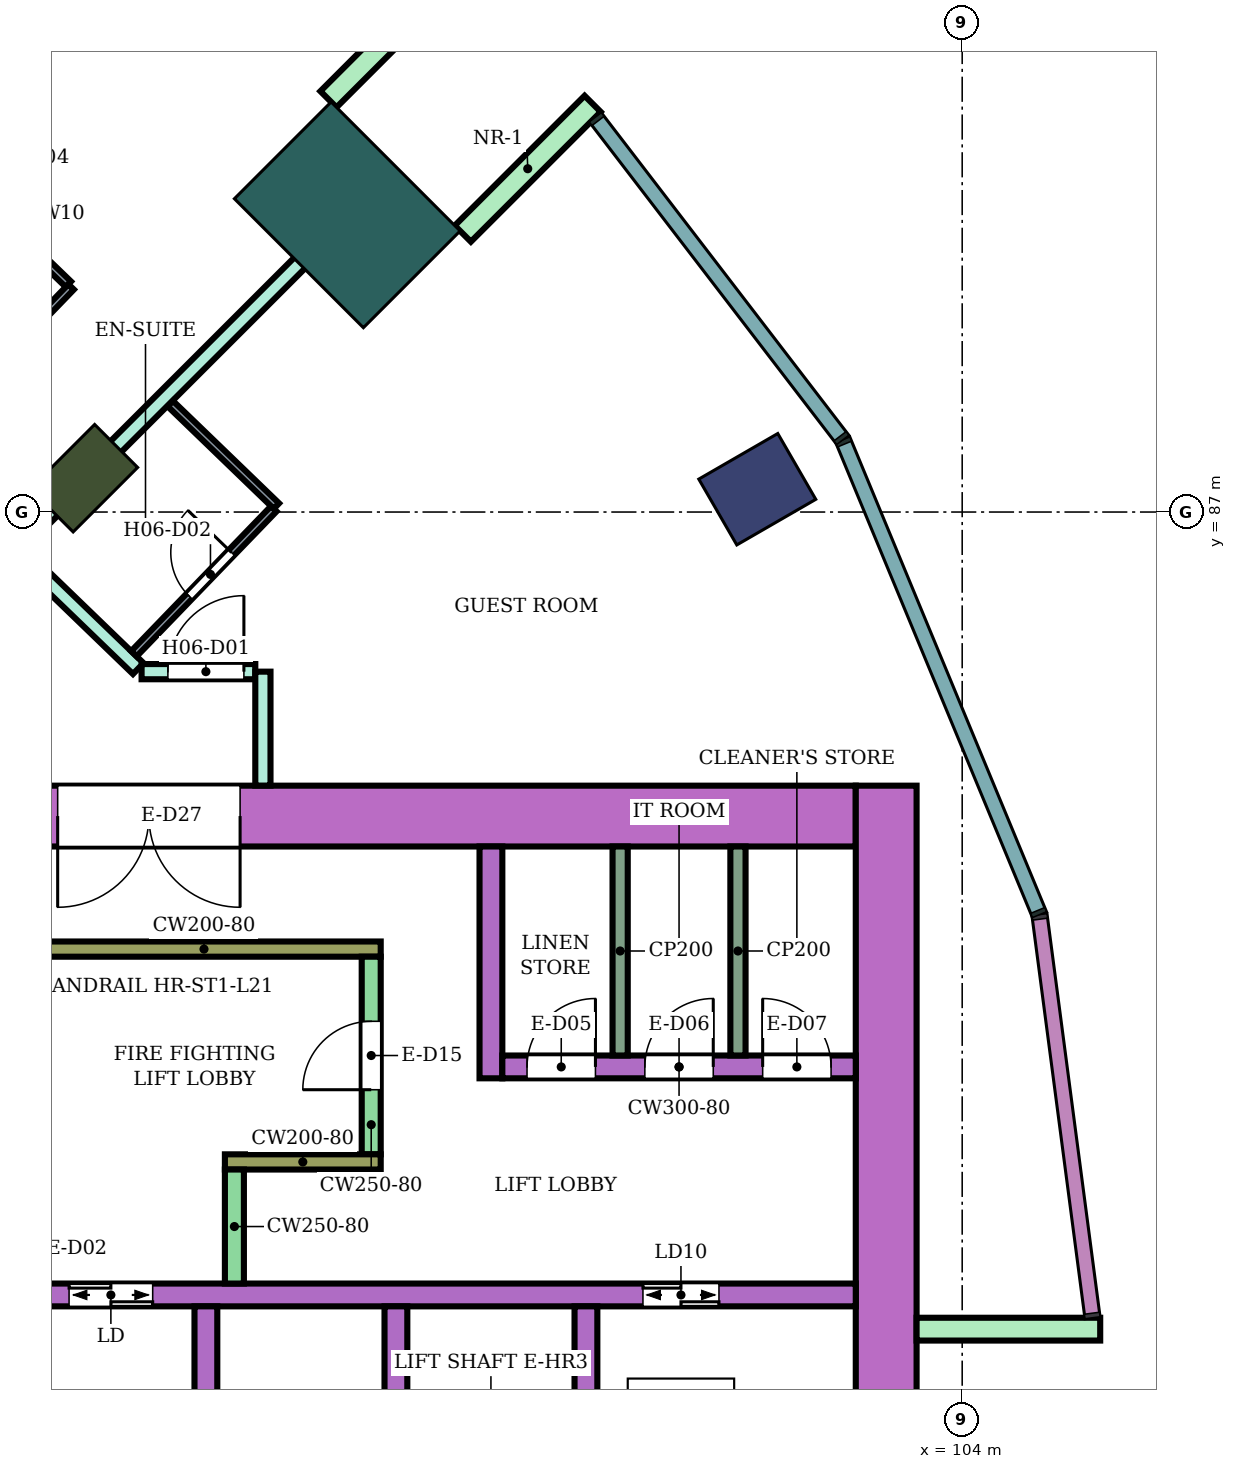
"""IFC4 building model, lengths in metres.
Left out: names, types, materials, properties, quantities, classifications, styles, units other than length and angle.
Written with IfcOpenShell. Run it as: python <this file> out.ifc"""

import sys

from ifc_helpers import new_model, si_unit, direction, frame, frame_2d, origin, origin_2d, place, context, subcontext, project, spatial, rectangle, extrude, element, fill, save


model = new_model("IFC4")
c1 = context("Model", 3, precision=1e-05, world=origin(), true_north=direction((0.0, 1.0)))
c2 = subcontext(c1, "Body", "Model", "MODEL_VIEW")
j1 = project(units=[si_unit("LENGTHUNIT", "METRE"), si_unit("PLANEANGLEUNIT", "RADIAN")], contexts=[c1])
p1 = place(None, origin())
s1 = spatial("IfcSite", under=j1, at=p1, CompositionType="ELEMENT")
p2 = place(p1, origin())
s2 = spatial("IfcBuilding", under=s1, at=p2, CompositionType="ELEMENT")
p3 = place(p2, frame((0.0, 0.0, 93.8)))
s3 = spatial("IfcBuildingStorey", under=s2, at=p3, CompositionType="ELEMENT", Elevation=93.8)
p4 = place(p3, frame((101.304, 87.3, 0.0), z_axis=(0.0, 0.0, 1.0), x_axis=(0.866025403784, 0.5, 0.0)))
e1 = element("IfcColumn", 1, at=p4, inside=s3, PredefinedType="COLUMN", context=c2, shape_type="SweptSolid", body=[
    extrude(rectangle(XDim=1.2, YDim=1.0, at=origin_2d()), origin(), (0.0, 0.0, 1.0), 3.8),
])
p5 = place(p3, frame((92.445, 87.445, 0.0), z_axis=(0.0, 0.0, 1.0), x_axis=(0.707106781187, 0.707106781187, 0.0)))
e2 = element("IfcColumn", 2, at=p5, inside=s3, PredefinedType="COLUMN", context=c2, shape_type="SweptSolid", body=[
    extrude(rectangle(XDim=1.2, YDim=0.8, at=origin_2d()), origin(), (0.0, 0.0, 1.0), 3.8),
])
p6 = place(p3, frame((95.91, 90.91, 0.0), z_axis=(0.0, 0.0, 1.0), x_axis=(0.707106781187, 0.707106781187, 0.0)))
e3 = element("IfcColumn", 3, at=p6, inside=s3, PredefinedType="COLUMN", context=c2, shape_type="SweptSolid", body=[
    extrude(rectangle(XDim=1.8, YDim=2.4, at=origin_2d()), origin(), (0.0, 0.0, 1.0), 3.8),
])
p7 = place(p3, frame((87.9, 83.0, 0.0), z_axis=(0.0, 0.0, 1.0), x_axis=(1.0, 0.0, 0.0)))
e4 = element("IfcWall", 4, at=p7, inside=s3, PredefinedType="SHEAR", context=c2, shape_type="SweptSolid", body=[
    extrude(rectangle(XDim=14.7, YDim=0.8, at=frame_2d((7.35, 0.0))), origin(), (0.0, 0.0, 1.0), 3.48),
])
p8 = place(p7, frame((4.2, 0.0, 0.0)))
e5 = element("IfcOpeningElement", 5, at=p8, cuts=e4, PredefinedType="OPENING", context=c2, shape_type="SweptSolid", body=[
    extrude(rectangle(XDim=2.4, YDim=2.4, at=frame_2d((1.2, 1.2))), frame((0.0, 0.41, 0.0), z_axis=(0.0, -1.0, 0.0), x_axis=(1.0, 0.0, 0.0)), (0.0, 0.0, 1.0), 0.82),
])
p9 = place(p3, frame((103.0, 66.6, 0.0), z_axis=(0.0, 0.0, 1.0), x_axis=(0.0, 1.0, 0.0)))
e6 = element("IfcWall", 6, at=p9, inside=s3, PredefinedType="SHEAR", context=c2, shape_type="SweptSolid", body=[
    extrude(rectangle(XDim=16.8, YDim=0.8, at=frame_2d((8.4, 0.0))), origin(), (0.0, 0.0, 1.0), 3.48),
])
p10 = place(p3, frame((91.7, 76.7, 0.0), z_axis=(0.0, 0.0, 1.0), x_axis=(1.0, 0.0, 0.0)))
e7 = element("IfcWall", 7, at=p10, inside=s3, PredefinedType="SHEAR", context=c2, shape_type="SweptSolid", body=[
    extrude(rectangle(XDim=10.9, YDim=0.3, at=frame_2d((5.45, 0.0))), origin(), (0.0, 0.0, 1.0), 3.48),
])
p11 = place(p10, frame((0.55, 0.0, 0.0)))
e8 = element("IfcOpeningElement", 8, at=p11, cuts=e7, PredefinedType="OPENING", context=c2, shape_type="SweptSolid", body=[
    extrude(rectangle(XDim=1.1, YDim=2.1, at=frame_2d((0.55, 1.05))), frame((0.0, 0.16, 0.0), z_axis=(0.0, -1.0, 0.0), x_axis=(1.0, 0.0, 0.0)), (0.0, 0.0, 1.0), 0.32),
])
p12 = place(p10, frame((8.1, 0.0, 0.0)))
e9 = element("IfcOpeningElement", 9, at=p12, cuts=e7, PredefinedType="OPENING", context=c2, shape_type="SweptSolid", body=[
    extrude(rectangle(XDim=1.0, YDim=2.1, at=frame_2d((0.5, 1.05))), frame((0.0, 0.16, 0.0), z_axis=(0.0, -1.0, 0.0), x_axis=(1.0, 0.0, 0.0)), (0.0, 0.0, 1.0), 0.32),
])
for number, where, z_axis, x_axis in (
    (10, (94.05, 74.0, 0.0), (0.0, 0.0, 1.0), (0.0, 1.0, 0.0)),
    (11, (96.55, 74.0, 0.0), (0.0, 0.0, 1.0), (0.0, 1.0, 0.0)),
    (12, (99.05, 74.0, 0.0), (0.0, 0.0, 1.0), (0.0, 1.0, 0.0)),
):
    element("IfcWall", number, at=place(p3, frame(where, z_axis=z_axis, x_axis=x_axis)), inside=s3, PredefinedType="SHEAR", context=c2, shape_type="SweptSolid", body=[
        extrude(rectangle(XDim=2.55, YDim=0.3, at=frame_2d((1.275, 0.0))), origin(), (0.0, 0.0, 1.0), 3.48),
    ])
p13 = place(p3, frame((91.7, 81.25, 0.0), z_axis=(0.0, 0.0, 1.0), x_axis=(1.0, 0.0, 0.0)))
e13 = element("IfcWall", 13, at=p13, inside=s3, PredefinedType="SHEAR", context=c2, shape_type="SweptSolid", body=[
    extrude(rectangle(XDim=4.65, YDim=0.2, at=frame_2d((2.325, 0.0))), origin(), (0.0, 0.0, 1.0), 3.48),
])
p14 = place(p3, frame((96.225, 78.55, 0.0), z_axis=(0.0, 0.0, 1.0), x_axis=(0.0, 1.0, 0.0)))
e14 = element("IfcWall", 14, at=p14, inside=s3, PredefinedType="SHEAR", context=c2, shape_type="SweptSolid", body=[
    extrude(rectangle(XDim=2.6, YDim=0.25, at=frame_2d((1.3, 0.0))), origin(), (0.0, 0.0, 1.0), 3.48),
])
p15 = place(p14, frame((0.85, 0.0, 0.0)))
e15 = element("IfcOpeningElement", 15, at=p15, cuts=e14, PredefinedType="OPENING", context=c2, shape_type="SweptSolid", body=[
    extrude(rectangle(XDim=0.9, YDim=2.1, at=frame_2d((0.45, 1.05))), frame((0.0, 0.135, 0.0), z_axis=(0.0, -1.0, 0.0), x_axis=(1.0, 0.0, 0.0)), (0.0, 0.0, 1.0), 0.27),
])
p16 = place(p3, frame((94.3, 78.45, 0.0), z_axis=(0.0, 0.0, 1.0), x_axis=(1.0, 0.0, 0.0)))
e16 = element("IfcWall", 16, at=p16, inside=s3, PredefinedType="SHEAR", context=c2, shape_type="SweptSolid", body=[
    extrude(rectangle(XDim=2.05, YDim=0.2, at=frame_2d((1.025, 0.0))), origin(), (0.0, 0.0, 1.0), 3.48),
])
p17 = place(p3, frame((94.425, 76.85, 0.0), z_axis=(0.0, 0.0, 1.0), x_axis=(0.0, 1.0, 0.0)))
e17 = element("IfcWall", 17, at=p17, inside=s3, PredefinedType="SHEAR", context=c2, shape_type="SweptSolid", body=[
    extrude(rectangle(XDim=1.5, YDim=0.25, at=frame_2d((0.75, 0.0))), origin(), (0.0, 0.0, 1.0), 3.48),
])
p18 = place(p3, frame((97.8, 79.55, 0.0), z_axis=(0.0, 0.0, 1.0), x_axis=(0.0, 1.0, 0.0)))
e18 = element("IfcWall", 18, at=p18, inside=s3, PredefinedType="SHEAR", context=c2, shape_type="SweptSolid", body=[
    extrude(rectangle(XDim=3.05, YDim=0.3, at=frame_2d((1.525, 0.0))), origin(), (0.0, 0.0, 1.0), 3.48),
])
p19 = place(p3, frame((97.95, 79.7, 0.0), z_axis=(0.0, 0.0, 1.0), x_axis=(1.0, 0.0, 0.0)))
e19 = element("IfcWall", 19, at=p19, inside=s3, PredefinedType="SHEAR", context=c2, shape_type="SweptSolid", body=[
    extrude(rectangle(XDim=4.65, YDim=0.3, at=frame_2d((2.325, 0.0))), origin(), (0.0, 0.0, 1.0), 3.48),
])
p20 = place(p19, frame((0.325, 0.0, 0.0)))
e20 = element("IfcOpeningElement", 20, at=p20, cuts=e19, PredefinedType="OPENING", context=c2, shape_type="SweptSolid", body=[
    extrude(rectangle(XDim=0.9, YDim=2.1, at=frame_2d((0.45, 1.05))), frame((0.0, 0.16, 0.0), z_axis=(0.0, -1.0, 0.0), x_axis=(1.0, 0.0, 0.0)), (0.0, 0.0, 1.0), 0.32),
])
p21 = place(p19, frame((1.875, 0.0, 0.0)))
e21 = element("IfcOpeningElement", 21, at=p21, cuts=e19, PredefinedType="OPENING", context=c2, shape_type="SweptSolid", body=[
    extrude(rectangle(XDim=0.9, YDim=2.1, at=frame_2d((0.45, 1.05))), frame((0.0, 0.16, 0.0), z_axis=(0.0, -1.0, 0.0), x_axis=(1.0, 0.0, 0.0)), (0.0, 0.0, 1.0), 0.32),
])
p22 = place(p19, frame((3.425, 0.0, 0.0)))
e22 = element("IfcOpeningElement", 22, at=p22, cuts=e19, PredefinedType="OPENING", context=c2, shape_type="SweptSolid", body=[
    extrude(rectangle(XDim=0.9, YDim=2.1, at=frame_2d((0.45, 1.05))), frame((0.0, 0.16, 0.0), z_axis=(0.0, -1.0, 0.0), x_axis=(1.0, 0.0, 0.0)), (0.0, 0.0, 1.0), 0.32),
])
for number, where, z_axis, x_axis in (
    (23, (103.4, 76.25, 0.0), (0.0, 0.0, 1.0), (1.0, 0.0, 0.0)),
    (24, (97.43, 90.662, 0.0), (0.0, 0.0, 1.0), (0.707, 0.707, 0.0)),
    (25, (95.662, 92.43, 0.0), (0.0, 0.0, 1.0), (0.707, 0.707, 0.0)),
):
    element("IfcWall", number, at=place(p3, frame(where, z_axis=z_axis, x_axis=x_axis)), inside=s3, PredefinedType="NOTDEFINED", context=c2, shape_type="SweptSolid", body=[
        extrude(rectangle(XDim=2.416, YDim=0.3, at=frame_2d((1.208, 0.0))), origin(), (0.0, 0.0, 1.0), 3.8),
    ])
p23 = place(p3, frame((88.465, 89.473, 0.0), z_axis=(0.0, 0.0, 1.0), x_axis=(0.719474304909, -0.694519059908, 0.0)))
e26 = element("IfcWall", 26, at=p23, inside=s3, PredefinedType="PARTITIONING", context=c2, shape_type="SweptSolid", body=[
    extrude(rectangle(XDim=6.525, YDim=0.2, at=frame_2d((3.263, 0.0))), origin(), (0.0, 0.0, 1.0), 3.35),
])
p24 = place(p23, frame((2.633, 0.0, 0.0)))
e27 = element("IfcOpeningElement", 27, at=p24, cuts=e26, PredefinedType="OPENING", context=c2, shape_type="SweptSolid", body=[
    extrude(rectangle(XDim=1.1, YDim=2.1, at=frame_2d((0.55, 1.05))), frame((0.0, 0.11, 0.0), z_axis=(0.0, -1.0, 0.0), x_axis=(1.0, 0.0, 0.0)), (0.0, 0.0, 1.0), 0.22),
])
p25 = place(p3, frame((88.4, 89.538, 0.0), z_axis=(0.0, 0.0, 1.0), x_axis=(0.500234695877, 0.865889859648, 0.0)))
e28 = element("IfcWall", 28, at=p25, inside=s3, PredefinedType="PARTITIONING", context=c2, shape_type="SweptSolid", body=[
    extrude(rectangle(XDim=9.007, YDim=0.2, at=frame_2d((4.503, 0.0))), origin(), (0.0, 0.0, 1.0), 3.35),
])
p26 = place(p3, frame((91.595, 86.59, 0.0), z_axis=(0.0, 0.0, 1.0), x_axis=(0.707232337591, 0.706981202484, 0.0)))
e29 = element("IfcWall", 29, at=p26, inside=s3, PredefinedType="PARTITIONING", context=c2, shape_type="SweptSolid", body=[
    extrude(rectangle(XDim=6.805, YDim=0.2, at=frame_2d((3.402, 0.0))), origin(), (0.0, 0.0, 1.0), 3.35),
])
p27 = place(p3, frame((93.204, 84.9, 0.0), z_axis=(0.0, 0.0, 1.0), x_axis=(1.0, 0.0, 0.0)))
e30 = element("IfcWall", 30, at=p27, inside=s3, PredefinedType="PARTITIONING", context=c2, shape_type="SweptSolid", body=[
    extrude(rectangle(XDim=1.496, YDim=0.2, at=frame_2d((0.748, 0.0))), origin(), (0.0, 0.0, 1.0), 3.35),
])
p28 = place(p27, frame((0.346, 0.0, 0.0)))
e31 = element("IfcOpeningElement", 31, at=p28, cuts=e30, PredefinedType="OPENING", context=c2, shape_type="SweptSolid", body=[
    extrude(rectangle(XDim=1.0, YDim=2.1, at=frame_2d((0.5, 1.05))), frame((0.0, 0.11, 0.0), z_axis=(0.0, -1.0, 0.0), x_axis=(1.0, 0.0, 0.0)), (0.0, 0.0, 1.0), 0.22),
])
p29 = place(p3, frame((94.8, 83.401, 0.0), z_axis=(0.0, 0.0, 1.0), x_axis=(0.0, 1.0, 0.0)))
e32 = element("IfcWall", 32, at=p29, inside=s3, PredefinedType="PARTITIONING", context=c2, shape_type="SweptSolid", body=[
    extrude(rectangle(XDim=1.499, YDim=0.2, at=frame_2d((0.75, 0.0))), origin(), (0.0, 0.0, 1.0), 3.35),
])
p30 = place(p3, frame((90.027, 92.134, 0.0), z_axis=(0.0, 0.0, 1.0), x_axis=(0.719415132118, -0.694580353652, 0.0)))
e33 = element("IfcWall", 33, at=p30, inside=s3, PredefinedType="PARTITIONING", context=c2, shape_type="SweptSolid", body=[
    extrude(rectangle(XDim=3.077, YDim=0.1, at=frame_2d((1.539, 0.0))), origin(), (0.0, 0.0, 1.0), 3.35),
])
p31 = place(p30, frame((1.053, 0.0, 0.0)))
e34 = element("IfcOpeningElement", 34, at=p31, cuts=e33, PredefinedType="OPENING", context=c2, shape_type="SweptSolid", body=[
    extrude(rectangle(XDim=0.9, YDim=2.1, at=frame_2d((0.45, 1.05))), frame((0.0, 0.06, 0.0), z_axis=(0.0, -1.0, 0.0), x_axis=(1.0, 0.0, 0.0)), (0.0, 0.0, 1.0), 0.12),
])
p32 = place(p3, frame((90.263, 87.876, 0.0), z_axis=(0.0, 0.0, 1.0), x_axis=(0.694534400859, 0.719459495749, 0.0)))
e35 = element("IfcWall", 35, at=p32, inside=s3, PredefinedType="PARTITIONING", context=c2, shape_type="SweptSolid", body=[
    extrude(rectangle(XDim=2.899, YDim=0.1, at=frame_2d((1.45, 0.0))), origin(), (0.0, 0.0, 1.0), 3.35),
])
p33 = place(p3, frame((93.104, 85.136, 0.0), z_axis=(0.0, 0.0, 1.0), x_axis=(0.694324808789, 0.719661767708, 0.0)))
e36 = element("IfcWall", 36, at=p33, inside=s3, PredefinedType="PARTITIONING", context=c2, shape_type="SweptSolid", body=[
    extrude(rectangle(XDim=2.65, YDim=0.1, at=frame_2d((1.325, 0.0))), origin(), (0.0, 0.0, 1.0), 3.35),
])
p34 = place(p33, frame((1.05, 0.0, 0.0)))
e37 = element("IfcOpeningElement", 37, at=p34, cuts=e36, PredefinedType="OPENING", context=c2, shape_type="SweptSolid", body=[
    extrude(rectangle(XDim=0.8, YDim=2.1, at=frame_2d((0.4, 1.05))), frame((0.0, 0.06, 0.0), z_axis=(0.0, -1.0, 0.0), x_axis=(1.0, 0.0, 0.0)), (0.0, 0.0, 1.0), 0.12),
])
p35 = place(p3, frame((93.582, 88.426, 0.0), z_axis=(0.0, 0.0, 1.0), x_axis=(0.719707242969, -0.694277670977, 0.0)))
e38 = element("IfcWall", 38, at=p35, inside=s3, PredefinedType="PARTITIONING", context=c2, shape_type="SweptSolid", body=[
    extrude(rectangle(XDim=1.939, YDim=0.1, at=frame_2d((0.97, 0.0))), origin(), (0.0, 0.0, 1.0), 3.35),
])
for number, where, z_axis, x_axis in (
    (39, (99.5, 79.85, 0.0), (0.0, 0.0, 1.0), (0.0, 1.0, 0.0)),
    (40, (101.05, 79.85, 0.0), (0.0, 0.0, 1.0), (0.0, 1.0, 0.0)),
):
    element("IfcWall", number, at=place(p3, frame(where, z_axis=z_axis, x_axis=x_axis)), inside=s3, PredefinedType="PARTITIONING", context=c2, shape_type="SweptSolid", body=[
        extrude(rectangle(XDim=2.75, YDim=0.2, at=frame_2d((1.375, 0.0))), origin(), (0.0, 0.0, 1.0), 3.48),
    ])
p36 = place(p28, origin())
e41 = element("IfcDoor", 41, at=p36, inside=s3, OperationType="SINGLE_SWING_RIGHT", PredefinedType="DOOR", context=c2, shape_type="SweptSolid", body=[
    extrude(rectangle(XDim=1.0, YDim=2.1, at=frame_2d((0.5, 1.05))), frame((0.0, 0.025, 0.0), z_axis=(0.0, -1.0, 0.0), x_axis=(1.0, 0.0, 0.0)), (0.0, 0.0, 1.0), 0.05),
])
fill(e31, e41)
p37 = place(p34, origin())
e42 = element("IfcDoor", 42, at=p37, inside=s3, OperationType="SINGLE_SWING_RIGHT", PredefinedType="DOOR", context=c2, shape_type="SweptSolid", body=[
    extrude(rectangle(XDim=0.8, YDim=2.1, at=frame_2d((0.4, 1.05))), frame((0.0, 0.025, 0.0), z_axis=(0.0, -1.0, 0.0), x_axis=(1.0, 0.0, 0.0)), (0.0, 0.0, 1.0), 0.05),
])
fill(e37, e42)
p38 = place(p11, origin())
e43 = element("IfcDoor", 43, at=p38, inside=s3, OperationType="DOUBLE_DOOR_SLIDING", PredefinedType="DOOR", context=c2, shape_type="SweptSolid", body=[
    extrude(rectangle(XDim=1.1, YDim=2.1, at=frame_2d((0.55, 1.05))), frame((0.0, 0.025, 0.0), z_axis=(0.0, -1.0, 0.0), x_axis=(1.0, 0.0, 0.0)), (0.0, 0.0, 1.0), 0.05),
])
fill(e8, e43)
p39 = place(p12, origin())
e44 = element("IfcDoor", 44, at=p39, inside=s3, OperationType="DOUBLE_DOOR_SLIDING", PredefinedType="DOOR", context=c2, shape_type="SweptSolid", body=[
    extrude(rectangle(XDim=1.0, YDim=2.1, at=frame_2d((0.5, 1.05))), frame((0.0, 0.025, 0.0), z_axis=(0.0, -1.0, 0.0), x_axis=(1.0, 0.0, 0.0)), (0.0, 0.0, 1.0), 0.05),
])
fill(e9, e44)
p40 = place(p15, origin())
e45 = element("IfcDoor", 45, at=p40, inside=s3, OperationType="SINGLE_SWING_LEFT", PredefinedType="DOOR", context=c2, shape_type="SweptSolid", body=[
    extrude(rectangle(XDim=0.9, YDim=2.1, at=frame_2d((0.45, 1.05))), frame((0.0, 0.025, 0.0), z_axis=(0.0, -1.0, 0.0), x_axis=(1.0, 0.0, 0.0)), (0.0, 0.0, 1.0), 0.05),
])
fill(e15, e45)
p41 = place(p20, origin())
e46 = element("IfcDoor", 46, at=p41, inside=s3, OperationType="SINGLE_SWING_RIGHT", PredefinedType="DOOR", context=c2, shape_type="SweptSolid", body=[
    extrude(rectangle(XDim=0.9, YDim=2.1, at=frame_2d((0.45, 1.05))), frame((0.0, 0.025, 0.0), z_axis=(0.0, -1.0, 0.0), x_axis=(1.0, 0.0, 0.0)), (0.0, 0.0, 1.0), 0.05),
])
fill(e20, e46)
p42 = place(p21, origin())
e47 = element("IfcDoor", 47, at=p42, inside=s3, OperationType="SINGLE_SWING_RIGHT", PredefinedType="DOOR", context=c2, shape_type="SweptSolid", body=[
    extrude(rectangle(XDim=0.9, YDim=2.1, at=frame_2d((0.45, 1.05))), frame((0.0, 0.025, 0.0), z_axis=(0.0, -1.0, 0.0), x_axis=(1.0, 0.0, 0.0)), (0.0, 0.0, 1.0), 0.05),
])
fill(e21, e47)
p43 = place(p22, origin())
e48 = element("IfcDoor", 48, at=p43, inside=s3, OperationType="SINGLE_SWING_LEFT", PredefinedType="DOOR", context=c2, shape_type="SweptSolid", body=[
    extrude(rectangle(XDim=0.9, YDim=2.1, at=frame_2d((0.45, 1.05))), frame((0.0, 0.025, 0.0), z_axis=(0.0, -1.0, 0.0), x_axis=(1.0, 0.0, 0.0)), (0.0, 0.0, 1.0), 0.05),
])
fill(e22, e48)
p44 = place(p8, frame((2.4, 0.0, 0.0), z_axis=(0.0, 0.0, 1.0), x_axis=(-1.0, 0.0, 0.0)))
e49 = element("IfcDoor", 49, at=p44, inside=s3, OperationType="DOUBLE_DOOR_SINGLE_SWING", PredefinedType="DOOR", context=c2, shape_type="SweptSolid", body=[
    extrude(rectangle(XDim=2.4, YDim=2.4, at=frame_2d((1.2, 1.2))), frame((0.0, 0.025, 0.0), z_axis=(0.0, -1.0, 0.0), x_axis=(1.0, 0.0, 0.0)), (0.0, 0.0, 1.0), 0.05),
])
fill(e5, e49)
save(model, sys.argv[1])
